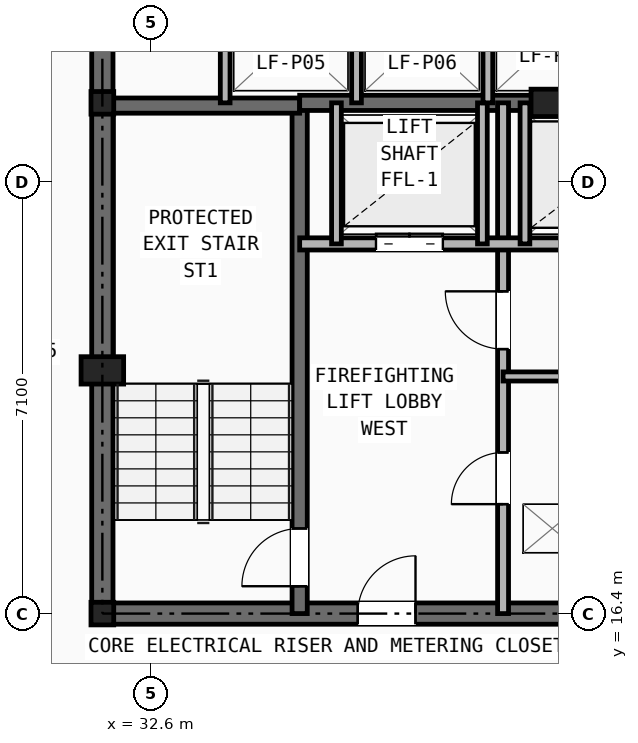
"""IFC4 building model, lengths in metres.
Left out: names, types, materials, properties, quantities, classifications, styles, units other than length and angle.
Written with IfcOpenShell. Run it as: python <this file> out.ifc"""

import sys

from ifc_helpers import new_model, si_unit, direction, frame, frame_2d, origin, origin_2d, place, context, subcontext, project, spatial, rectangle, i_section, extrude, element, fill, save


model = new_model("IFC4")
c1 = context("Model", 3, precision=1e-05, world=origin(), true_north=direction((0.0, 1.0)))
c2 = subcontext(c1, "Body", "Model", "MODEL_VIEW")
j1 = project(units=[si_unit("LENGTHUNIT", "METRE"), si_unit("PLANEANGLEUNIT", "RADIAN")], contexts=[c1])
p1 = place(None, origin())
s1 = spatial("IfcSite", under=j1, at=p1, CompositionType="ELEMENT")
p2 = place(p1, origin())
s2 = spatial("IfcBuilding", under=s1, at=p2, CompositionType="ELEMENT")
p3 = place(p2, frame((0.0, 0.0, 99.0)))
s3 = spatial("IfcBuildingStorey", under=s2, at=p3, CompositionType="ELEMENT", Elevation=99.0)
for number, where, z_axis, x_axis in (
    (1, (31.8, 16.4, 0.0), (0.0, 0.0, 1.0), (1.0, 0.0, 0.0)),
    (2, (31.8, 24.8, 0.0), (0.0, 0.0, 1.0), (1.0, 0.0, 0.0)),
):
    element("IfcColumn", number, at=place(p3, frame(where, z_axis=z_axis, x_axis=x_axis)), inside=s3, PredefinedType="COLUMN", context=c2, shape_type="SweptSolid", body=[
        extrude(i_section(OverallWidth=0.374, OverallDepth=0.372, WebThickness=0.016, FlangeThickness=0.026, at=origin_2d()), origin(), (0.0, 0.0, 1.0), 3.2),
    ])
for number, where, z_axis, x_axis in (
    (3, (31.8, 20.4, 0.0), (0.0, 0.0, 1.0), (1.0, 0.0, 0.0)),
    (4, (39.2, 24.8, 0.0), (0.0, 0.0, 1.0), (1.0, 0.0, 0.0)),
):
    element("IfcColumn", number, at=place(p3, frame(where, z_axis=z_axis, x_axis=x_axis)), inside=s3, PredefinedType="PILASTER", context=c2, shape_type="SweptSolid", body=[
        extrude(rectangle(XDim=0.7, YDim=0.45, at=origin_2d()), origin(), (0.0, 0.0, 1.0), 3.2),
    ])
p4 = place(p3, frame((31.8, 16.4, 0.0), z_axis=(0.0, 0.0, 1.0), x_axis=(1.0, 0.0, 0.0)))
e5 = element("IfcWall", 5, at=p4, inside=s3, PredefinedType="SHEAR", context=c2, shape_type="SweptSolid", body=[
    extrude(rectangle(XDim=16.4, YDim=0.35, at=frame_2d((8.2, 0.0))), origin(), (0.0, 0.0, 1.0), 2.97),
])
p5 = place(p4, frame((4.2, 0.0, 0.0)))
e6 = element("IfcOpeningElement", 6, at=p5, cuts=e5, PredefinedType="OPENING", context=c2, shape_type="SweptSolid", body=[
    extrude(rectangle(XDim=0.95, YDim=2.1, at=frame_2d((0.475, 1.05))), frame((0.0, 0.185, 0.0), z_axis=(0.0, -1.0, 0.0), x_axis=(1.0, 0.0, 0.0)), (0.0, 0.0, 1.0), 0.37),
])
p6 = place(p4, frame((10.6, 0.0, 0.0)))
e7 = element("IfcOpeningElement", 7, at=p6, cuts=e5, PredefinedType="OPENING", context=c2, shape_type="SweptSolid", body=[
    extrude(rectangle(XDim=0.95, YDim=2.1, at=frame_2d((0.475, 1.05))), frame((0.0, 0.185, 0.0), z_axis=(0.0, -1.0, 0.0), x_axis=(1.0, 0.0, 0.0)), (0.0, 0.0, 1.0), 0.37),
])
p7 = place(p3, frame((31.8, 16.4, 0.0), z_axis=(0.0, 0.0, 1.0), x_axis=(0.0, 1.0, 0.0)))
e8 = element("IfcWall", 8, at=p7, inside=s3, PredefinedType="SHEAR", context=c2, shape_type="SweptSolid", body=[
    extrude(rectangle(XDim=14.8, YDim=0.35, at=frame_2d((7.4, 0.0))), origin(), (0.0, 0.0, 1.0), 2.97),
])
p8 = place(p7, frame((11.0, 0.0, 0.0)))
e9 = element("IfcOpeningElement", 9, at=p8, cuts=e8, PredefinedType="OPENING", context=c2, shape_type="SweptSolid", body=[
    extrude(rectangle(XDim=1.1, YDim=2.15, at=frame_2d((0.55, 1.075))), frame((0.0, 0.185, 0.0), z_axis=(0.0, -1.0, 0.0), x_axis=(1.0, 0.0, 0.0)), (0.0, 0.0, 1.0), 0.37),
])
p9 = place(p3, frame((35.045, 16.4, 0.0), z_axis=(0.0, 0.0, 1.0), x_axis=(0.0, 1.0, 0.0)))
e10 = element("IfcWall", 10, at=p9, inside=s3, PredefinedType="SHEAR", context=c2, shape_type="SweptSolid", body=[
    extrude(rectangle(XDim=8.4, YDim=0.25, at=frame_2d((4.2, 0.0))), origin(), (0.0, 0.0, 1.0), 2.97),
])
p10 = place(p9, frame((0.45, 0.0, 0.0)))
e11 = element("IfcOpeningElement", 11, at=p10, cuts=e10, PredefinedType="OPENING", context=c2, shape_type="SweptSolid", body=[
    extrude(rectangle(XDim=0.95, YDim=2.1, at=frame_2d((0.475, 1.05))), frame((0.0, 0.135, 0.0), z_axis=(0.0, -1.0, 0.0), x_axis=(1.0, 0.0, 0.0)), (0.0, 0.0, 1.0), 0.27),
])
p11 = place(p3, frame((31.8, 24.755, 0.0), z_axis=(0.0, 0.0, 1.0), x_axis=(1.0, 0.0, 0.0)))
e12 = element("IfcWall", 12, at=p11, inside=s3, PredefinedType="SHEAR", context=c2, shape_type="SweptSolid", body=[
    extrude(rectangle(XDim=3.245, YDim=0.25, at=frame_2d((1.623, 0.0))), origin(), (0.0, 0.0, 1.0), 2.97),
])
p12 = place(p3, frame((35.045, 24.8, 0.0), z_axis=(0.0, 0.0, 1.0), x_axis=(1.0, 0.0, 0.0)))
e13 = element("IfcWall", 13, at=p12, inside=s3, PredefinedType="SHEAR", context=c2, shape_type="SweptSolid", body=[
    extrude(rectangle(XDim=9.91, YDim=0.25, at=frame_2d((4.955, 0.0))), origin(), (0.0, 0.0, 1.0), 2.97),
])
p13 = place(p3, frame((38.39, 16.4, 0.0), z_axis=(0.0, 0.0, 1.0), x_axis=(0.0, 1.0, 0.0)))
e14 = element("IfcWall", 14, at=p13, inside=s3, PredefinedType="PARTITIONING", context=c2, shape_type="SweptSolid", body=[
    extrude(rectangle(XDim=8.4, YDim=0.18, at=frame_2d((4.2, 0.0))), origin(), (0.0, 0.0, 1.0), 2.421),
])
p14 = place(p13, frame((1.8, 0.0, 0.0)))
e15 = element("IfcOpeningElement", 15, at=p14, cuts=e14, PredefinedType="OPENING", context=c2, shape_type="SweptSolid", body=[
    extrude(rectangle(XDim=0.85, YDim=2.05, at=frame_2d((0.425, 1.025))), frame((0.0, 0.1, 0.0), z_axis=(0.0, -1.0, 0.0), x_axis=(1.0, 0.0, 0.0)), (0.0, 0.0, 1.0), 0.2),
])
p15 = place(p13, frame((4.35, 0.0, 0.0)))
e16 = element("IfcOpeningElement", 16, at=p15, cuts=e14, PredefinedType="OPENING", context=c2, shape_type="SweptSolid", body=[
    extrude(rectangle(XDim=0.95, YDim=2.1, at=frame_2d((0.475, 1.05))), frame((0.0, 0.1, 0.0), z_axis=(0.0, -1.0, 0.0), x_axis=(1.0, 0.0, 0.0)), (0.0, 0.0, 1.0), 0.2),
])
p16 = place(p3, frame((35.045, 22.48, 0.0), z_axis=(0.0, 0.0, 1.0), x_axis=(1.0, 0.0, 0.0)))
e17 = element("IfcWall", 17, at=p16, inside=s3, PredefinedType="SOLIDWALL", context=c2, shape_type="SweptSolid", body=[
    extrude(rectangle(XDim=9.91, YDim=0.2, at=frame_2d((4.955, 0.0))), origin(), (0.0, 0.0, 1.0), 2.97),
])
p17 = place(p16, frame((1.255, 0.0, 0.0)))
e18 = element("IfcOpeningElement", 18, at=p17, cuts=e17, PredefinedType="OPENING", context=c2, shape_type="SweptSolid", body=[
    extrude(rectangle(XDim=1.1, YDim=2.15, at=frame_2d((0.55, 1.075))), frame((0.0, 0.11, 0.0), z_axis=(0.0, -1.0, 0.0), x_axis=(1.0, 0.0, 0.0)), (0.0, 0.0, 1.0), 0.22),
])
p18 = place(p16, frame((7.555, 0.0, 0.0)))
e19 = element("IfcOpeningElement", 19, at=p18, cuts=e17, PredefinedType="OPENING", context=c2, shape_type="SweptSolid", body=[
    extrude(rectangle(XDim=1.1, YDim=2.15, at=frame_2d((0.55, 1.075))), frame((0.0, 0.11, 0.0), z_axis=(0.0, -1.0, 0.0), x_axis=(1.0, 0.0, 0.0)), (0.0, 0.0, 1.0), 0.22),
])
p19 = place(p16, frame((4.405, 0.0, 0.0)))
e20 = element("IfcOpeningElement", 20, at=p19, cuts=e17, PredefinedType="OPENING", context=c2, shape_type="SweptSolid", body=[
    extrude(rectangle(XDim=1.1, YDim=2.15, at=frame_2d((0.55, 1.075))), frame((0.0, 0.11, 0.0), z_axis=(0.0, -1.0, 0.0), x_axis=(1.0, 0.0, 0.0)), (0.0, 0.0, 1.0), 0.22),
])
p20 = place(p3, frame((38.39, 20.3, 0.0), z_axis=(0.0, 0.0, 1.0), x_axis=(1.0, 0.0, 0.0)))
e21 = element("IfcWall", 21, at=p20, inside=s3, PredefinedType="PARTITIONING", context=c2, shape_type="SweptSolid", body=[
    extrude(rectangle(XDim=3.22, YDim=0.15, at=frame_2d((1.61, 0.0))), origin(), (0.0, 0.0, 1.0), 2.97),
])
for number, where, z_axis, x_axis in (
    (22, (35.65, 22.48, 0.0), (0.0, 0.0, 1.0), (0.0, 1.0, 0.0)),
    (23, (38.05, 22.48, 0.0), (0.0, 0.0, 1.0), (0.0, 1.0, 0.0)),
    (24, (38.75, 22.48, 0.0), (0.0, 0.0, 1.0), (0.0, 1.0, 0.0)),
):
    element("IfcWall", number, at=place(p3, frame(where, z_axis=z_axis, x_axis=x_axis)), inside=s3, PredefinedType="SOLIDWALL", context=c2, shape_type="SweptSolid", body=[
        extrude(rectangle(XDim=2.32, YDim=0.16, at=frame_2d((1.16, 0.0))), origin(), (0.0, 0.0, 1.0), 2.97),
    ])
for number, where, z_axis, x_axis in (
    (25, (33.82, 24.8, 0.0), (0.0, 0.0, 1.0), (0.0, 1.0, 0.0)),
    (26, (35.98, 24.8, 0.0), (0.0, 0.0, 1.0), (0.0, 1.0, 0.0)),
    (27, (38.14, 24.8, 0.0), (0.0, 0.0, 1.0), (0.0, 1.0, 0.0)),
):
    element("IfcWall", number, at=place(p3, frame(where, z_axis=z_axis, x_axis=x_axis)), inside=s3, PredefinedType="SOLIDWALL", context=c2, shape_type="SweptSolid", body=[
        extrude(rectangle(XDim=2.08, YDim=0.16, at=frame_2d((1.04, 0.0))), origin(), (0.0, 0.0, 1.0), 2.97),
    ])
p21 = place(p14, origin())
e28 = element("IfcDoor", 28, at=p21, inside=s3, OperationType="SINGLE_SWING_LEFT", PredefinedType="DOOR", context=c2, shape_type="SweptSolid", body=[
    extrude(rectangle(XDim=0.85, YDim=2.05, at=frame_2d((0.425, 1.025))), frame((0.0, 0.025, 0.0), z_axis=(0.0, -1.0, 0.0), x_axis=(1.0, 0.0, 0.0)), (0.0, 0.0, 1.0), 0.05),
])
fill(e15, e28)
p22 = place(p15, origin())
e29 = element("IfcDoor", 29, at=p22, inside=s3, OperationType="SINGLE_SWING_RIGHT", PredefinedType="DOOR", context=c2, shape_type="SweptSolid", body=[
    extrude(rectangle(XDim=0.95, YDim=2.1, at=frame_2d((0.475, 1.05))), frame((0.0, 0.025, 0.0), z_axis=(0.0, -1.0, 0.0), x_axis=(1.0, 0.0, 0.0)), (0.0, 0.0, 1.0), 0.05),
])
fill(e16, e29)
p23 = place(p10, origin())
e30 = element("IfcDoor", 30, at=p23, inside=s3, OperationType="SINGLE_SWING_LEFT", PredefinedType="DOOR", context=c2, shape_type="SweptSolid", body=[
    extrude(rectangle(XDim=0.95, YDim=2.1, at=frame_2d((0.475, 1.05))), frame((0.0, 0.025, 0.0), z_axis=(0.0, -1.0, 0.0), x_axis=(1.0, 0.0, 0.0)), (0.0, 0.0, 1.0), 0.05),
])
fill(e11, e30)
p24 = place(p5, origin())
e31 = element("IfcDoor", 31, at=p24, inside=s3, OperationType="SINGLE_SWING_RIGHT", PredefinedType="DOOR", context=c2, shape_type="SweptSolid", body=[
    extrude(rectangle(XDim=0.95, YDim=2.1, at=frame_2d((0.475, 1.05))), frame((0.0, 0.025, 0.0), z_axis=(0.0, -1.0, 0.0), x_axis=(1.0, 0.0, 0.0)), (0.0, 0.0, 1.0), 0.05),
])
fill(e6, e31)
p25 = place(p17, origin())
e32 = element("IfcDoor", 32, at=p25, inside=s3, OperationType="DOUBLE_DOOR_SLIDING", PredefinedType="DOOR", context=c2, shape_type="SweptSolid", body=[
    extrude(rectangle(XDim=1.1, YDim=2.15, at=frame_2d((0.55, 1.075))), frame((0.0, 0.025, 0.0), z_axis=(0.0, -1.0, 0.0), x_axis=(1.0, 0.0, 0.0)), (0.0, 0.0, 1.0), 0.05),
])
fill(e18, e32)
save(model, sys.argv[1])
